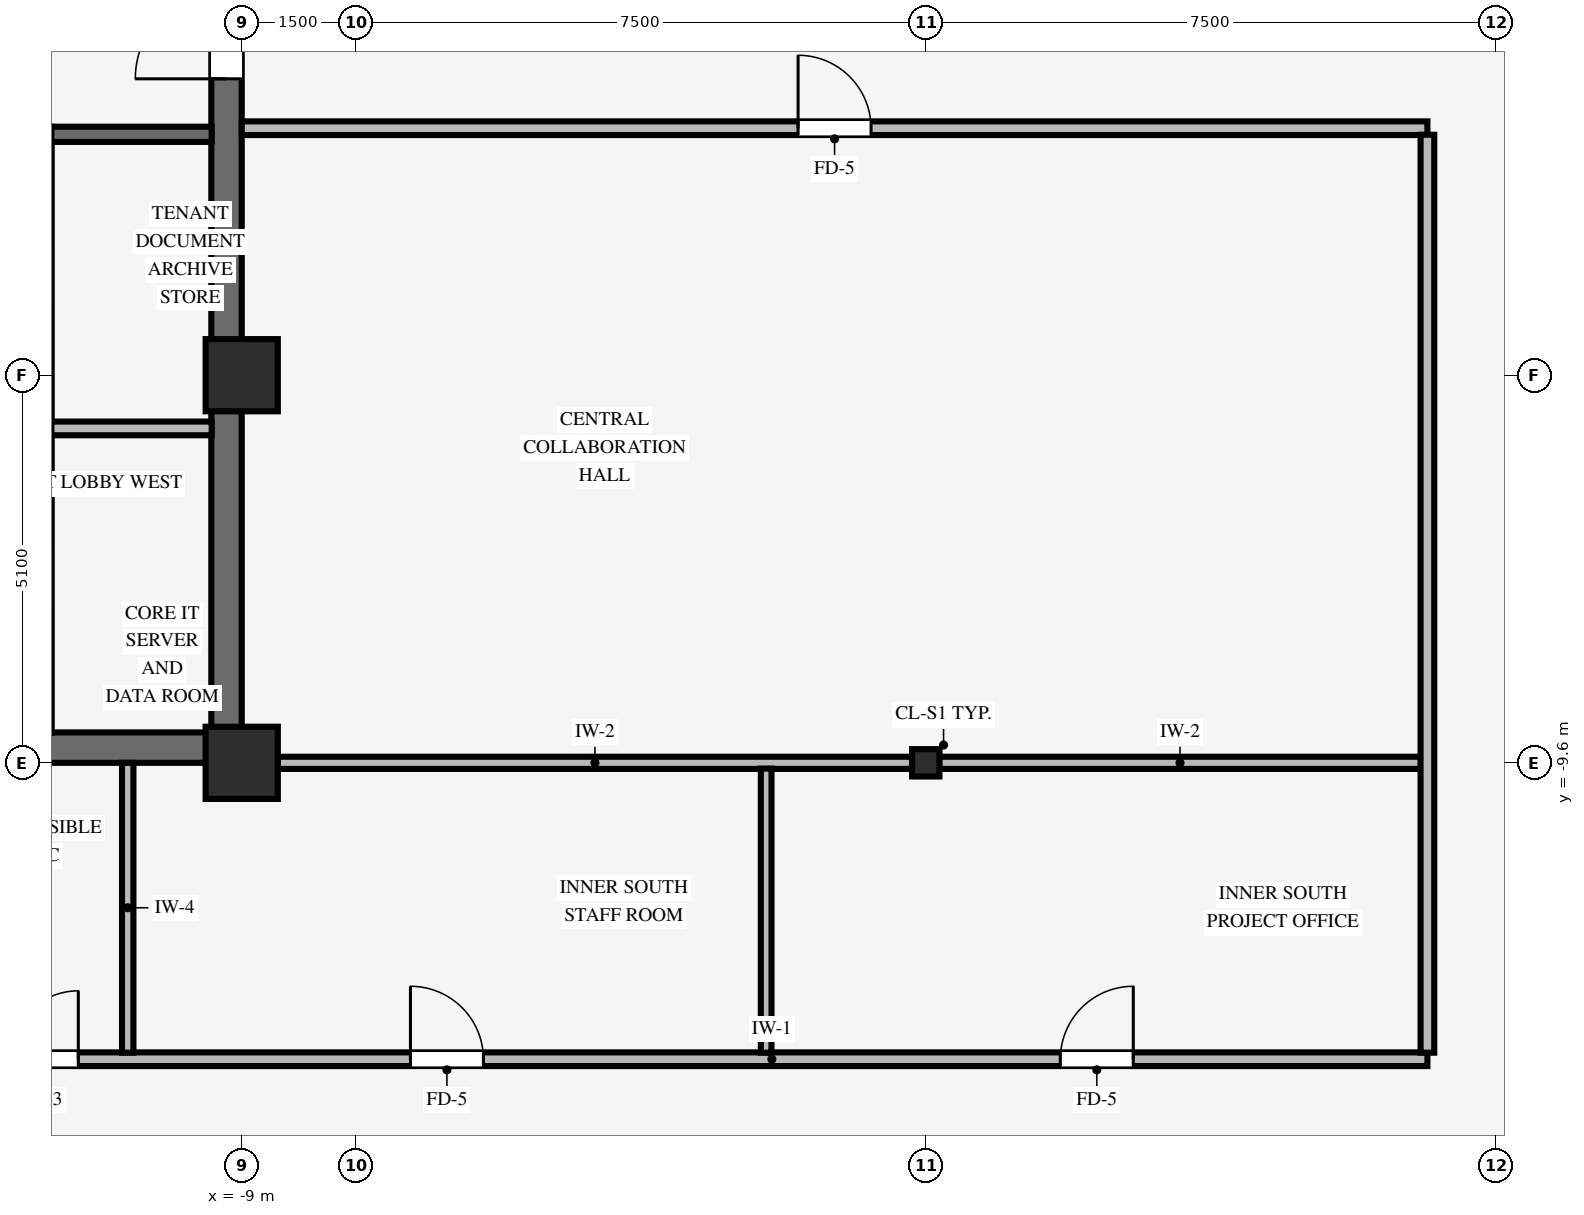
"""IFC4 building model, lengths in metres.
Left out: names, types, materials, properties, quantities, classifications, styles, units other than length and angle.
Written with IfcOpenShell. Run it as: python <this file> out.ifc"""

import sys

from ifc_helpers import new_model, si_unit, direction, frame, frame_2d, origin, origin_2d, place, context, subcontext, project, spatial, rectangle, i_section, extrude, source, transform, mapped, element, fill, save


model = new_model("IFC4")
c1 = context("Model", 3, precision=1e-05, world=origin(), true_north=direction((0.0, 1.0)))
c2 = subcontext(c1, "Body", "Model", "MODEL_VIEW")
j1 = project(units=[si_unit("LENGTHUNIT", "METRE"), si_unit("PLANEANGLEUNIT", "RADIAN")], contexts=[c1])
p1 = place(None, origin())
s1 = spatial("IfcSite", under=j1, at=p1, CompositionType="ELEMENT")
p2 = place(p1, origin())
s2 = spatial("IfcBuilding", under=s1, at=p2, CompositionType="ELEMENT")
p3 = place(p2, frame((0.0, 0.0, 127.5)))
s3 = spatial("IfcBuildingStorey", under=s2, at=p3, CompositionType="ELEMENT", Elevation=127.5)
p4 = place(p3, frame((-17.5, -9.4, 0.0), z_axis=(0.0, 0.0, 1.0), x_axis=(1.0, 0.0, 0.0)))
e1 = element("IfcWall", 1, at=p4, inside=s3, PredefinedType="SHEAR", context=c2, shape_type="SweptSolid", body=[
    extrude(rectangle(XDim=8.5, YDim=0.4, at=frame_2d((4.25, 0.0))), origin(), (0.0, 0.0, 1.0), 3.37),
])
p5 = place(p3, frame((-9.2, -9.205, 0.0), z_axis=(0.0, 0.0, 1.0), x_axis=(0.0, 1.0, 0.0)))
e2 = element("IfcWall", 2, at=p5, inside=s3, PredefinedType="SHEAR", context=c2, shape_type="SweptSolid", body=[
    extrude(rectangle(XDim=18.41, YDim=0.4, at=frame_2d((9.205, 0.0))), origin(), (0.0, 0.0, 1.0), 3.37),
])
p6 = place(p5, frame((8.605, 0.0, 0.0)))
e3 = element("IfcOpeningElement", 3, at=p6, cuts=e2, PredefinedType="OPENING", context=c2, shape_type="SweptSolid", body=[
    extrude(rectangle(XDim=1.2, YDim=2.15, at=frame_2d((0.6, 1.075))), frame((0.0, 0.21, 0.0), z_axis=(0.0, -1.0, 0.0), x_axis=(1.0, 0.0, 0.0)), (0.0, 0.0, 1.0), 0.42),
])
for number, where, z_axis, x_axis in (
    (4, (-9.0, -9.6, 0.0), (0.0, 0.0, 1.0), (1.0, 0.0, 0.0)),
    (5, (-9.0, -4.5, 0.0), (0.0, 0.0, 1.0), (1.0, 0.0, 0.0)),
):
    element("IfcColumn", number, at=place(p3, frame(where, z_axis=z_axis, x_axis=x_axis)), inside=s3, PredefinedType="COLUMN", context=c2, shape_type="SweptSolid", body=[
        extrude(rectangle(XDim=0.95, YDim=0.95, at=origin_2d()), origin(), (0.0, 0.0, 1.0), 3.37),
    ])
p7 = place(p3, frame((0.0, -9.6, 0.0), z_axis=(0.0, 0.0, 1.0), x_axis=(1.0, 0.0, 0.0)))
e6 = element("IfcColumn", 6, at=p7, inside=s3, PredefinedType="COLUMN", context=c2, shape_type="SweptSolid", body=[
    extrude(i_section(OverallWidth=0.36, OverallDepth=0.36, WebThickness=0.021, FlangeThickness=0.021, FilletRadius=0.018, at=origin_2d()), origin(), (0.0, 0.0, 1.0), 3.37),
])
p8 = place(p3, frame((-11.505, -1.33, 0.0), z_axis=(0.0, 0.0, 1.0), x_axis=(1.0, 0.0, 0.0)))
e7 = element("IfcWall", 7, at=p8, inside=s3, PredefinedType="SHEAR", context=c2, shape_type="SweptSolid", body=[
    extrude(rectangle(XDim=2.11, YDim=0.2, at=frame_2d((1.055, 0.0))), origin(), (0.0, 0.0, 1.0), 3.37),
])
p9 = place(p3, frame((-11.505, -5.2, 0.0), z_axis=(0.0, 0.0, 1.0), x_axis=(1.0, 0.0, 0.0)))
e8 = element("IfcWall", 8, at=p9, inside=s3, PredefinedType="PARTITIONING", context=c2, shape_type="SweptSolid", body=[
    extrude(rectangle(XDim=2.11, YDim=0.18, at=frame_2d((1.055, 0.0))), origin(), (0.0, 0.0, 1.0), 3.36),
])
p10 = place(p3, frame((-17.7, -13.5, 0.0), z_axis=(0.0, 0.0, 1.0), x_axis=(1.0, 0.0, 0.0)))
e9 = element("IfcWall", 9, at=p10, inside=s3, PredefinedType="PARTITIONING", context=c2, shape_type="SweptSolid", body=[
    extrude(rectangle(XDim=24.3, YDim=0.18, at=frame_2d((12.15, 0.0))), origin(), (0.0, 0.0, 1.0), 2.998),
])
p11 = place(p10, frame((19.47, 0.0, 0.0)))
e10 = element("IfcOpeningElement", 10, at=p11, cuts=e9, PredefinedType="OPENING", context=c2, shape_type="SweptSolid", body=[
    extrude(rectangle(XDim=0.96, YDim=2.1, at=frame_2d((0.48, 1.05))), frame((0.0, 0.1, 0.0), z_axis=(0.0, -1.0, 0.0), x_axis=(1.0, 0.0, 0.0)), (0.0, 0.0, 1.0), 0.2),
])
p12 = place(p10, frame((10.92, 0.0, 0.0)))
e11 = element("IfcOpeningElement", 11, at=p12, cuts=e9, PredefinedType="OPENING", context=c2, shape_type="SweptSolid", body=[
    extrude(rectangle(XDim=0.96, YDim=2.1, at=frame_2d((0.48, 1.05))), frame((0.0, 0.1, 0.0), z_axis=(0.0, -1.0, 0.0), x_axis=(1.0, 0.0, 0.0)), (0.0, 0.0, 1.0), 0.2),
])
p13 = place(p10, frame((3.3, 0.0, 0.0)))
e12 = element("IfcOpeningElement", 12, at=p13, cuts=e9, PredefinedType="OPENING", context=c2, shape_type="SweptSolid", body=[
    extrude(rectangle(XDim=0.9, YDim=2.1, at=frame_2d((0.45, 1.05))), frame((0.0, 0.1, 0.0), z_axis=(0.0, -1.0, 0.0), x_axis=(1.0, 0.0, 0.0)), (0.0, 0.0, 1.0), 0.2),
])
p14 = place(p10, frame((5.65, 0.0, 0.0)))
e13 = element("IfcOpeningElement", 13, at=p14, cuts=e9, PredefinedType="OPENING", context=c2, shape_type="SweptSolid", body=[
    extrude(rectangle(XDim=0.9, YDim=2.1, at=frame_2d((0.45, 1.05))), frame((0.0, 0.1, 0.0), z_axis=(0.0, -1.0, 0.0), x_axis=(1.0, 0.0, 0.0)), (0.0, 0.0, 1.0), 0.2),
])
p15 = place(p3, frame((-8.529, -9.6, 0.0), z_axis=(0.0, 0.0, 1.0), x_axis=(1.0, 0.0, 0.0)))
e14 = element("IfcWall", 14, at=p15, inside=s3, PredefinedType="PARTITIONING", context=c2, shape_type="SweptSolid", body=[
    extrude(rectangle(XDim=8.353, YDim=0.16, at=frame_2d((4.177, 0.0))), origin(), (0.0, 0.0, 1.0), 2.405),
])
p16 = place(p3, frame((0.176, -9.6, 0.0), z_axis=(0.0, 0.0, 1.0), x_axis=(1.0, 0.0, 0.0)))
e15 = element("IfcWall", 15, at=p16, inside=s3, PredefinedType="PARTITIONING", context=c2, shape_type="SweptSolid", body=[
    extrude(rectangle(XDim=6.338, YDim=0.16, at=frame_2d((3.169, 0.0))), origin(), (0.0, 0.0, 1.0), 2.405),
])
p17 = place(p3, frame((-9.0, -1.25, 0.0), z_axis=(0.0, 0.0, 1.0), x_axis=(1.0, 0.0, 0.0)))
e16 = element("IfcWall", 16, at=p17, inside=s3, PredefinedType="PARTITIONING", context=c2, shape_type="SweptSolid", body=[
    extrude(rectangle(XDim=15.6, YDim=0.18, at=frame_2d((7.8, 0.0))), origin(), (0.0, 0.0, 1.0), 3.36),
])
p18 = place(p17, frame((7.32, 0.0, 0.0)))
e17 = element("IfcOpeningElement", 17, at=p18, cuts=e16, PredefinedType="OPENING", context=c2, shape_type="SweptSolid", body=[
    extrude(rectangle(XDim=0.96, YDim=2.1, at=frame_2d((0.48, 1.05))), frame((0.0, 0.1, 0.0), z_axis=(0.0, -1.0, 0.0), x_axis=(1.0, 0.0, 0.0)), (0.0, 0.0, 1.0), 0.2),
])
p19 = place(p3, frame((-10.5, -13.414, 0.0), z_axis=(0.0, 0.0, 1.0), x_axis=(0.0, 1.0, 0.0)))
e18 = element("IfcWall", 18, at=p19, inside=s3, PredefinedType="PARTITIONING", context=c2, shape_type="SweptSolid", body=[
    extrude(rectangle(XDim=3.814, YDim=0.15, at=frame_2d((1.907, 0.0))), origin(), (0.0, 0.0, 1.0), 3.36),
])
p20 = place(p3, frame((-2.1, -13.414, 0.0), z_axis=(0.0, 0.0, 1.0), x_axis=(0.0, 1.0, 0.0)))
e19 = element("IfcWall", 19, at=p20, inside=s3, PredefinedType="PARTITIONING", context=c2, shape_type="SweptSolid", body=[
    extrude(rectangle(XDim=3.738, YDim=0.14, at=frame_2d((1.869, 0.0))), origin(), (0.0, 0.0, 1.0), 3.36),
])
p21 = place(p3, frame((6.6, -13.414, 0.0), z_axis=(0.0, 0.0, 1.0), x_axis=(0.0, 1.0, 0.0)))
e20 = element("IfcWall", 20, at=p21, inside=s3, PredefinedType="PARTITIONING", context=c2, shape_type="SweptSolid", body=[
    extrude(rectangle(XDim=12.078, YDim=0.18, at=frame_2d((6.039, 0.0))), origin(), (0.0, 0.0, 1.0), 3.36),
])
m1 = source(origin(), c2, "Body", "SweptSolid", [
    extrude(rectangle(XDim=1.2, YDim=2.15, at=frame_2d((0.6, 1.075))), frame((0.0, 0.025, 0.0), z_axis=(0.0, -1.0, 0.0), x_axis=(1.0, 0.0, 0.0)), (0.0, 0.0, 1.0), 0.05),
])
p22 = place(p6, origin())
e21 = element("IfcDoor", 21, at=p22, inside=s3, OperationType="SINGLE_SWING_LEFT", PredefinedType="DOOR", context=c2, shape_type="MappedRepresentation", body=[
    mapped(m1, transform((0.0, 0.0, 0.0), scale=1.0)),
])
fill(e3, e21)
m2 = source(origin(), c2, "Body", "SweptSolid", [
    extrude(rectangle(XDim=0.96, YDim=2.1, at=frame_2d((0.48, 1.05))), frame((0.0, 0.025, 0.0), z_axis=(0.0, -1.0, 0.0), x_axis=(1.0, 0.0, 0.0)), (0.0, 0.0, 1.0), 0.05),
])
p23 = place(p18, origin())
e22 = element("IfcDoor", 22, at=p23, inside=s3, OperationType="SINGLE_SWING_LEFT", PredefinedType="DOOR", context=c2, shape_type="MappedRepresentation", body=[
    mapped(m2, transform((0.0, 0.0, 0.0), scale=1.0)),
])
fill(e17, e22)
p24 = place(p11, origin())
e23 = element("IfcDoor", 23, at=p24, inside=s3, OperationType="SINGLE_SWING_RIGHT", PredefinedType="DOOR", context=c2, shape_type="MappedRepresentation", body=[
    mapped(m2, transform((0.0, 0.0, 0.0), scale=1.0)),
])
fill(e10, e23)
p25 = place(p12, origin())
e24 = element("IfcDoor", 24, at=p25, inside=s3, OperationType="SINGLE_SWING_LEFT", PredefinedType="DOOR", context=c2, shape_type="MappedRepresentation", body=[
    mapped(m2, transform((0.0, 0.0, 0.0), scale=1.0)),
])
fill(e11, e24)
m3 = source(origin(), c2, "Body", "SweptSolid", [
    extrude(rectangle(XDim=0.9, YDim=2.1, at=frame_2d((0.45, 1.05))), frame((0.0, 0.025, 0.0), z_axis=(0.0, -1.0, 0.0), x_axis=(1.0, 0.0, 0.0)), (0.0, 0.0, 1.0), 0.05),
])
p26 = place(p14, origin())
e25 = element("IfcDoor", 25, at=p26, inside=s3, OperationType="SINGLE_SWING_RIGHT", PredefinedType="DOOR", context=c2, shape_type="MappedRepresentation", body=[
    mapped(m3, transform((0.0, 0.0, 0.0), scale=1.0)),
])
fill(e13, e25)
save(model, sys.argv[1])
